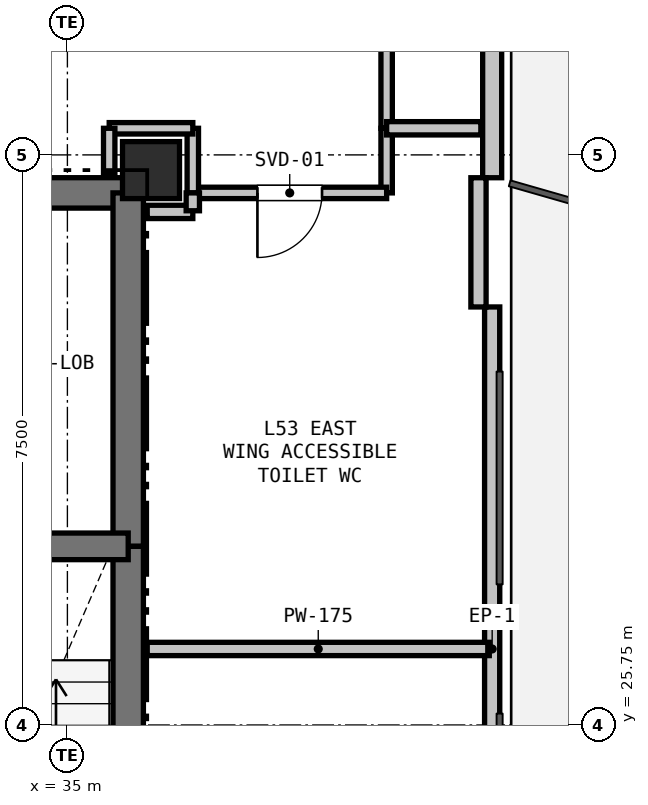
"""IFC4 building model, lengths in metres.
Left out: names, types, materials, properties, quantities, classifications, styles, units other than length and angle.
Written with IfcOpenShell. Run it as: python <this file> out.ifc"""

import sys

from ifc_helpers import new_model, si_unit, direction, frame, frame_2d, origin, origin_2d, place, context, subcontext, project, spatial, rectangle, extrude, element, fill, save


model = new_model("IFC4")
c1 = context("Model", 3, precision=1e-05, world=origin(), true_north=direction((0.0, 1.0)))
c2 = subcontext(c1, "Body", "Model", "MODEL_VIEW")
j1 = project(units=[si_unit("LENGTHUNIT", "METRE"), si_unit("PLANEANGLEUNIT", "RADIAN")], contexts=[c1])
p1 = place(None, origin())
s1 = spatial("IfcSite", under=j1, at=p1, CompositionType="ELEMENT")
p2 = place(p1, origin())
s2 = spatial("IfcBuilding", under=s1, at=p2, CompositionType="ELEMENT")
p3 = place(p2, frame((0.0, 0.0, 192.0)))
s3 = spatial("IfcBuildingStorey", under=s2, at=p3, CompositionType="ELEMENT", Elevation=192.0)
p4 = place(p3, frame((36.1, 33.05, 0.0), z_axis=(0.0, 0.0, 1.0), x_axis=(1.0, 0.0, 0.0)))
e1 = element("IfcColumn", 1, at=p4, inside=s3, PredefinedType="COLUMN", context=c2, shape_type="SweptSolid", body=[
    extrude(rectangle(XDim=0.75, YDim=0.75, at=origin_2d()), origin(), (0.0, 0.0, 1.0), 3.3),
])
p5 = place(p3, frame((40.588, 42.648, 0.0), z_axis=(0.0, 0.0, 1.0), x_axis=(0.0, -1.0, 0.0)))
e2 = element("IfcWall", 2, at=p5, inside=s3, PredefinedType="SOLIDWALL", context=c2, shape_type="SweptSolid", body=[
    extrude(rectangle(XDim=9.699, YDim=0.25, at=frame_2d((4.85, 0.0))), origin(), (0.0, 0.0, 1.0), 2.69),
])
p6 = place(p5, frame((1.73, 0.0, 0.0)))
e3 = element("IfcOpeningElement", 3, at=p6, cuts=e2, PredefinedType="OPENING", context=c2, shape_type="SweptSolid", body=[
    extrude(rectangle(XDim=1.1, YDim=2.1, at=frame_2d((0.55, 1.05))), frame((0.0, 0.135, 0.0), z_axis=(0.0, -1.0, 0.0), x_axis=(1.0, 0.0, 0.0)), (0.0, 0.0, 1.0), 0.27),
])
p7 = place(p3, frame((40.588, 31.25, 0.0), z_axis=(0.0, 0.0, 1.0), x_axis=(0.0, -1.0, 0.0)))
e4 = element("IfcWall", 4, at=p7, inside=s3, PredefinedType="PARAPET", context=c2, shape_type="SweptSolid", body=[
    extrude(rectangle(XDim=8.999, YDim=0.2, at=frame_2d((4.5, 0.0))), origin(), (0.0, 0.0, 1.0), 0.2),
])
p8 = place(p3, frame((40.408, 32.949, 0.0), z_axis=(0.0, 0.0, 1.0), x_axis=(0.0, -1.0, 0.0)))
e5 = element("IfcWall", 5, at=p8, inside=s3, PredefinedType="PARAPET", context=c2, shape_type="SweptSolid", body=[
    extrude(rectangle(XDim=1.7, YDim=0.2, at=frame_2d((0.85, 0.0))), origin(), (0.0, 0.0, 1.0), 2.69),
])
p9 = place(p3, frame((32.35, 32.75, 0.0), z_axis=(0.0, 0.0, 1.0), x_axis=(1.0, 0.0, 0.0)))
e6 = element("IfcWall", 6, at=p9, inside=s3, PredefinedType="SHEAR", context=c2, shape_type="SweptSolid", body=[
    extrude(rectangle(XDim=3.45, YDim=0.4, at=frame_2d((1.725, 0.0))), origin(), (0.0, 0.0, 1.0), 3.07),
])
p10 = place(p9, frame((0.65, 0.0, 0.0)))
e7 = element("IfcOpeningElement", 7, at=p10, cuts=e6, PredefinedType="OPENING", context=c2, shape_type="SweptSolid", body=[
    extrude(rectangle(XDim=1.15, YDim=2.15, at=frame_2d((0.575, 1.075))), frame((0.0, 0.21, 0.0), z_axis=(0.0, -1.0, 0.0), x_axis=(1.0, 0.0, 0.0)), (0.0, 0.0, 1.0), 0.42),
])
p11 = place(p3, frame((35.8, 32.75, 0.0), z_axis=(0.0, 0.0, 1.0), x_axis=(0.0, -1.0, 0.0)))
e8 = element("IfcWall", 8, at=p11, inside=s3, PredefinedType="SHEAR", context=c2, shape_type="SweptSolid", body=[
    extrude(rectangle(XDim=4.65, YDim=0.4, at=frame_2d((2.325, 0.0))), origin(), (0.0, 0.0, 1.0), 3.07),
])
p12 = place(p3, frame((35.8, 28.1, 0.0), z_axis=(0.0, 0.0, 1.0), x_axis=(0.0, -1.0, 0.0)))
e9 = element("IfcWall", 9, at=p12, inside=s3, PredefinedType="SHEAR", context=c2, shape_type="SweptSolid", body=[
    extrude(rectangle(XDim=7.35, YDim=0.4, at=frame_2d((3.675, 0.0))), origin(), (0.0, 0.0, 1.0), 3.07),
])
p13 = place(p3, frame((32.35, 28.1, 0.0), z_axis=(0.0, 0.0, 1.0), x_axis=(1.0, 0.0, 0.0)))
e10 = element("IfcWall", 10, at=p13, inside=s3, PredefinedType="SHEAR", context=c2, shape_type="SweptSolid", body=[
    extrude(rectangle(XDim=3.45, YDim=0.35, at=frame_2d((1.725, 0.0))), origin(), (0.0, 0.0, 1.0), 3.07),
])
p14 = place(p13, frame((1.15, 0.0, 0.0)))
e11 = element("IfcOpeningElement", 11, at=p14, cuts=e10, PredefinedType="OPENING", context=c2, shape_type="SweptSolid", body=[
    extrude(rectangle(XDim=1.15, YDim=2.15, at=frame_2d((0.575, 1.075))), frame((0.0, 0.185, 0.0), z_axis=(0.0, -1.0, 0.0), x_axis=(1.0, 0.0, 0.0)), (0.0, 0.0, 1.0), 0.37),
])
p15 = place(p3, frame((39.2, 35.35, 0.0), z_axis=(0.0, 0.0, 1.0), x_axis=(0.0, -1.0, 0.0)))
e12 = element("IfcWall", 12, at=p15, inside=s3, PredefinedType="PARTITIONING", context=c2, shape_type="SweptSolid", body=[
    extrude(rectangle(XDim=1.75, YDim=0.15, at=frame_2d((0.875, 0.0))), origin(), (0.0, 0.0, 1.0), 3.07),
])
p16 = place(p3, frame((39.2, 33.6, 0.0), z_axis=(0.0, 0.0, 1.0), x_axis=(0.0, -1.0, 0.0)))
e13 = element("IfcWall", 13, at=p16, inside=s3, PredefinedType="PARTITIONING", context=c2, shape_type="SweptSolid", body=[
    extrude(rectangle(XDim=0.85, YDim=0.15, at=frame_2d((0.425, 0.0))), origin(), (0.0, 0.0, 1.0), 3.07),
])
p17 = place(p3, frame((39.2, 32.75, 0.0), z_axis=(0.0, 0.0, 1.0), x_axis=(-1.0, 0.0, 0.0)))
e14 = element("IfcWall", 14, at=p17, inside=s3, PredefinedType="PARTITIONING", context=c2, shape_type="SweptSolid", body=[
    extrude(rectangle(XDim=2.55, YDim=0.15, at=frame_2d((1.275, 0.0))), origin(), (0.0, 0.0, 1.0), 3.07),
])
p18 = place(p17, frame((0.85, 0.0, 0.0)))
e15 = element("IfcOpeningElement", 15, at=p18, cuts=e14, PredefinedType="OPENING", context=c2, shape_type="SweptSolid", body=[
    extrude(rectangle(XDim=0.85, YDim=2.1, at=frame_2d((0.425, 1.05))), frame((0.0, 0.085, 0.0), z_axis=(0.0, -1.0, 0.0), x_axis=(1.0, 0.0, 0.0)), (0.0, 0.0, 1.0), 0.17),
])
p19 = place(p3, frame((36.65, 32.75, 0.0), z_axis=(0.0, 0.0, 1.0), x_axis=(0.0, 1.0, 0.0)))
e16 = element("IfcWall", 16, at=p19, inside=s3, PredefinedType="PARTITIONING", context=c2, shape_type="SweptSolid", body=[
    extrude(rectangle(XDim=0.85, YDim=0.15, at=frame_2d((0.425, 0.0))), origin(), (0.0, 0.0, 1.0), 2.518),
])
p20 = place(p3, frame((36.65, 33.6, 0.0), z_axis=(0.0, 0.0, 1.0), x_axis=(-1.0, 0.0, 0.0)))
e17 = element("IfcWall", 17, at=p20, inside=s3, PredefinedType="PARTITIONING", context=c2, shape_type="SweptSolid", body=[
    extrude(rectangle(XDim=1.1, YDim=0.15, at=frame_2d((0.55, 0.0))), origin(), (0.0, 0.0, 1.0), 2.518),
])
p21 = place(p3, frame((35.55, 33.6, 0.0), z_axis=(0.0, 0.0, 1.0), x_axis=(0.0, -1.0, 0.0)))
e18 = element("IfcWall", 18, at=p21, inside=s3, PredefinedType="PARTITIONING", context=c2, shape_type="SweptSolid", body=[
    extrude(rectangle(XDim=0.6, YDim=0.15, at=frame_2d((0.3, 0.0))), origin(), (0.0, 0.0, 1.0), 2.595),
])
p22 = place(p3, frame((36.05, 32.5, 0.0), z_axis=(0.0, 0.0, 1.0), x_axis=(1.0, 0.0, 0.0)))
e19 = element("IfcWall", 19, at=p22, inside=s3, PredefinedType="PLUMBINGWALL", context=c2, shape_type="SweptSolid", body=[
    extrude(rectangle(XDim=0.6, YDim=0.175, at=frame_2d((0.3, 0.0))), origin(), (0.0, 0.0, 1.0), 2.595),
])
p23 = place(p3, frame((36.65, 32.515, 0.0), z_axis=(0.0, 0.0, 1.0), x_axis=(0.0, 1.0, 0.0)))
e20 = element("IfcWall", 20, at=p23, inside=s3, PredefinedType="PLUMBINGWALL", context=c2, shape_type="SweptSolid", body=[
    extrude(rectangle(XDim=0.235, YDim=0.175, at=frame_2d((0.118, 0.0))), origin(), (0.0, 0.0, 1.0), 3.07),
])
p24 = place(p3, frame((39.2, 33.6, 0.0), z_axis=(0.0, 0.0, 1.0), x_axis=(1.0, 0.0, 0.0)))
e21 = element("IfcWall", 21, at=p24, inside=s3, PredefinedType="PLUMBINGWALL", context=c2, shape_type="SweptSolid", body=[
    extrude(rectangle(XDim=1.24, YDim=0.175, at=frame_2d((0.62, 0.0))), origin(), (0.0, 0.0, 1.0), 2.365),
])
p25 = place(p3, frame((40.55, 26.75, 0.0), z_axis=(0.0, 0.0, 1.0), x_axis=(-1.0, 0.0, 0.0)))
e22 = element("IfcWall", 22, at=p25, inside=s3, PredefinedType="PLUMBINGWALL", context=c2, shape_type="SweptSolid", body=[
    extrude(rectangle(XDim=4.5, YDim=0.175, at=frame_2d((2.25, 0.0))), origin(), (0.0, 0.0, 1.0), 2.365),
])
p26 = place(p18, origin())
e23 = element("IfcDoor", 23, at=p26, inside=s3, OperationType="SINGLE_SWING_RIGHT", PredefinedType="DOOR", context=c2, shape_type="SweptSolid", body=[
    extrude(rectangle(XDim=0.85, YDim=2.1, at=frame_2d((0.425, 1.05))), frame((0.0, 0.025, 0.0), z_axis=(0.0, -1.0, 0.0), x_axis=(1.0, 0.0, 0.0)), (0.0, 0.0, 1.0), 0.05),
])
fill(e15, e23)
save(model, sys.argv[1])
